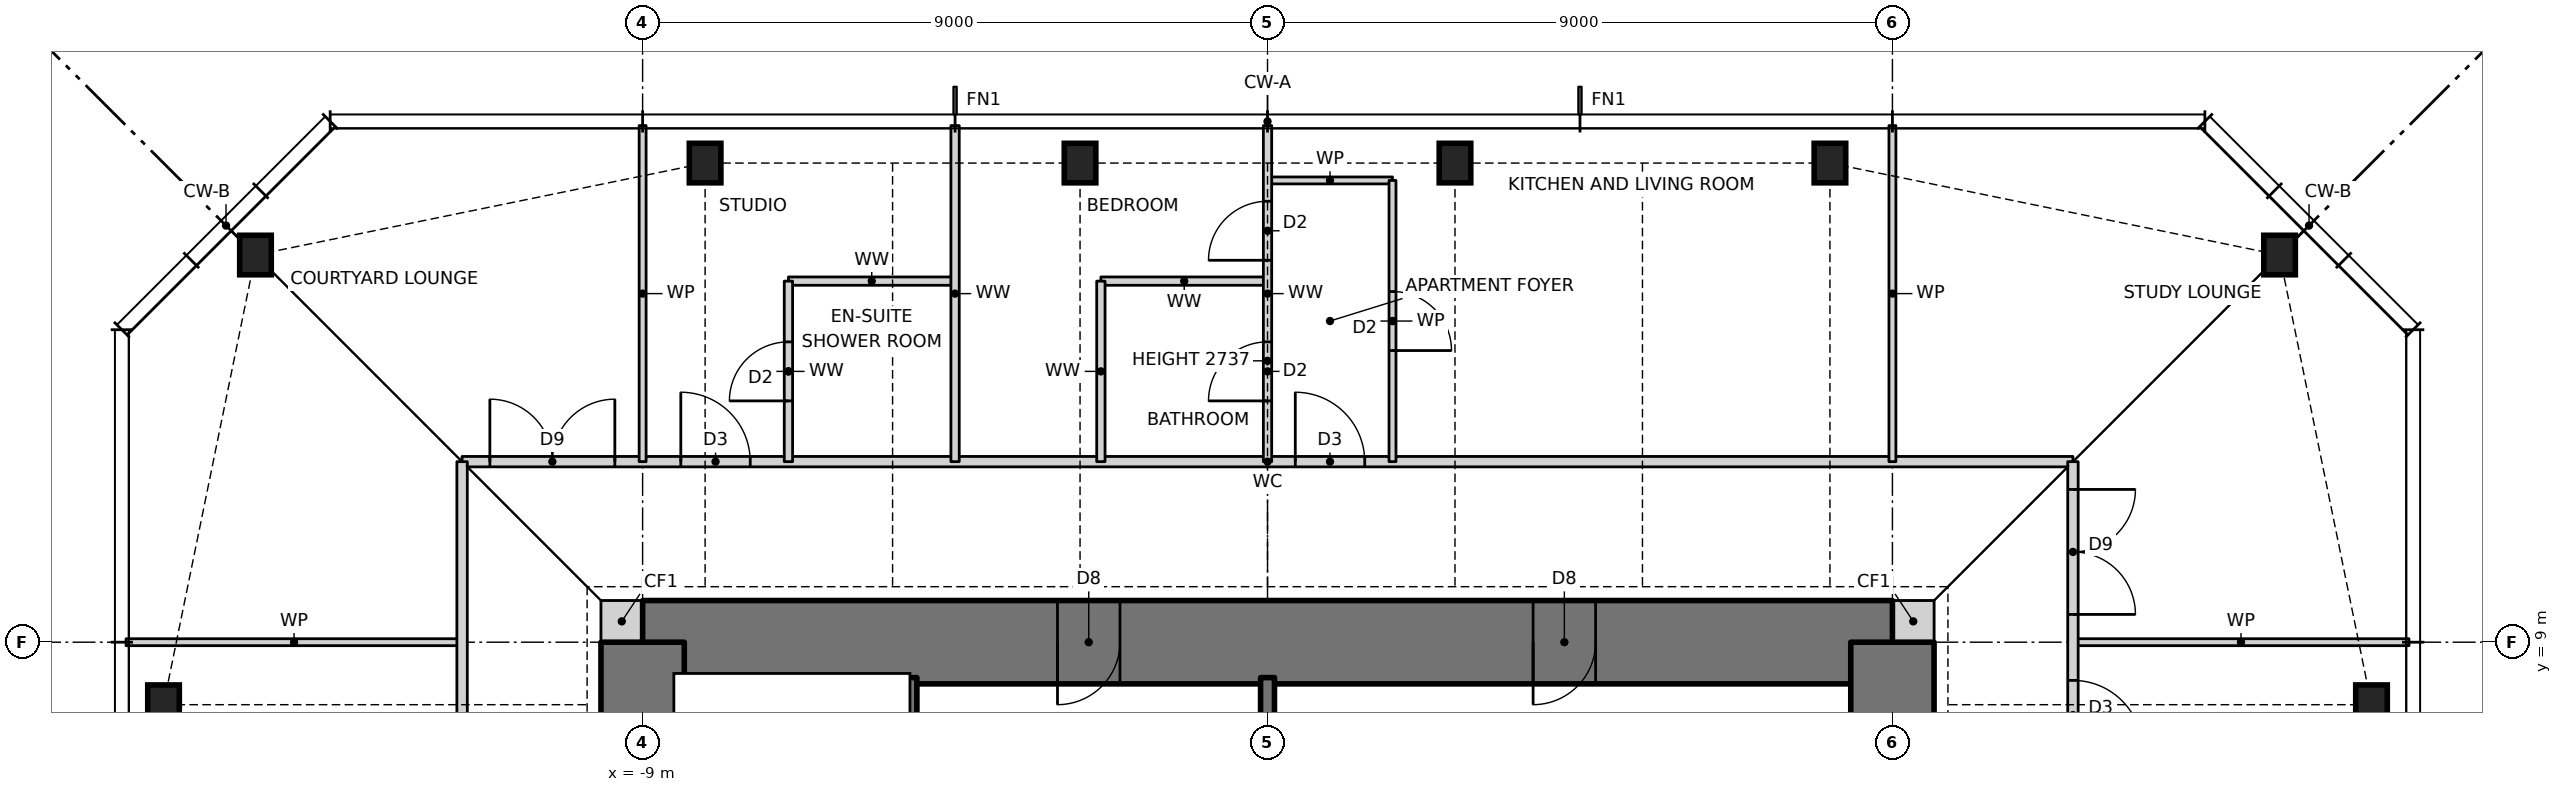
"""IFC4 building model, lengths in metres.
Left out: names, types, materials, properties, quantities, classifications, styles, units other than length and angle.
Written with IfcOpenShell. Run it as: python <this file> out.ifc"""

import sys

from ifc_helpers import new_model, si_unit, direction, frame, frame_2d, origin, origin_2d, place, context, subcontext, project, spatial, rectangle, i_section, extrude, element, fill, save


model = new_model("IFC4")
c1 = context("Model", 3, precision=1e-05, world=origin(), true_north=direction((0.0, 1.0)))
c2 = subcontext(c1, "Body", "Model", "MODEL_VIEW")
j1 = project(units=[si_unit("LENGTHUNIT", "METRE"), si_unit("PLANEANGLEUNIT", "RADIAN")], contexts=[c1])
p1 = place(None, origin())
s1 = spatial("IfcSite", under=j1, at=p1, CompositionType="ELEMENT")
p2 = place(p1, origin())
s2 = spatial("IfcBuilding", under=s1, at=p2, CompositionType="ELEMENT")
p3 = place(p2, frame((0.0, 0.0, 229.0)))
s3 = spatial("IfcBuildingStorey", under=s2, at=p3, CompositionType="ELEMENT", Elevation=229.0)
for number, where, z_axis, x_axis in (
    (1, (15.9, 8.1, 0.0), (0.0, 0.0, 1.0), (1.0, 0.0, 0.0)),
    (2, (14.576, 14.576, 0.0), (0.0, 0.0, 1.0), (1.0, 0.0, 0.0)),
    (3, (8.1, 15.9, 0.0), (0.0, 0.0, 1.0), (1.0, 0.0, 0.0)),
    (4, (2.7, 15.9, 0.0), (0.0, 0.0, 1.0), (1.0, 0.0, 0.0)),
    (5, (-2.7, 15.9, 0.0), (0.0, 0.0, 1.0), (1.0, 0.0, 0.0)),
    (6, (-8.1, 15.9, 0.0), (0.0, 0.0, 1.0), (1.0, 0.0, 0.0)),
    (7, (-14.576, 14.576, 0.0), (0.0, 0.0, 1.0), (1.0, 0.0, 0.0)),
    (8, (-15.9, 8.1, 0.0), (0.0, 0.0, 1.0), (1.0, 0.0, 0.0)),
):
    element("IfcColumn", number, at=place(p3, frame(where, z_axis=z_axis, x_axis=x_axis)), inside=s3, PredefinedType="COLUMN", context=c2, shape_type="SweptSolid", body=[
        extrude(i_section(OverallWidth=0.455, OverallDepth=0.569, WebThickness=0.078, FlangeThickness=0.125, at=origin_2d()), origin(), (0.0, 0.0, 1.0), 3.5),
    ])
for number, where, z_axis, x_axis in (
    (9, (9.0, 9.3, 0.0), (0.0, 0.0, 1.0), (1.0, 0.0, 0.0)),
    (10, (-9.6, 9.3, 0.0), (0.0, 0.0, 1.0), (1.0, 0.0, 0.0)),
):
    element("IfcWall", number, at=place(p3, frame(where, z_axis=z_axis, x_axis=x_axis)), inside=s3, PredefinedType="SOLIDWALL", context=c2, shape_type="SweptSolid", body=[
        extrude(rectangle(XDim=0.6, YDim=0.6, at=frame_2d((0.3, 0.0))), origin(), (0.0, 0.0, 1.0), 3.5),
    ])
p4 = place(p3, frame((9.0, 9.0, 0.0), z_axis=(0.0, 0.0, 1.0), x_axis=(-1.0, 0.0, 0.0)))
e11 = element("IfcWall", 11, at=p4, inside=s3, PredefinedType="SHEAR", context=c2, shape_type="SweptSolid", body=[
    extrude(rectangle(XDim=18.0, YDim=1.2, at=frame_2d((9.0, 0.0))), origin(), (0.0, 0.0, 1.0), 3.5),
])
p5 = place(p4, frame((11.125, 0.0, 0.0)))
e12 = element("IfcOpeningElement", 12, at=p5, cuts=e11, PredefinedType="OPENING", context=c2, shape_type="SweptSolid", body=[
    extrude(rectangle(XDim=0.9, YDim=2.1, at=frame_2d((0.45, 1.05))), frame((0.0, 0.61, 0.0), z_axis=(0.0, -1.0, 0.0), x_axis=(1.0, 0.0, 0.0)), (0.0, 0.0, 1.0), 1.22),
])
p6 = place(p4, frame((4.275, 0.0, 0.0)))
e13 = element("IfcOpeningElement", 13, at=p6, cuts=e11, PredefinedType="OPENING", context=c2, shape_type="SweptSolid", body=[
    extrude(rectangle(XDim=0.9, YDim=2.1, at=frame_2d((0.45, 1.05))), frame((0.0, 0.61, 0.0), z_axis=(0.0, -1.0, 0.0), x_axis=(1.0, 0.0, 0.0)), (0.0, 0.0, 1.0), 1.22),
])
p7 = place(p3, frame((9.0, -9.0, 0.0), z_axis=(0.0, 0.0, 1.0), x_axis=(0.0, 1.0, 0.0)))
e14 = element("IfcWall", 14, at=p7, inside=s3, PredefinedType="SHEAR", context=c2, shape_type="SweptSolid", body=[
    extrude(rectangle(XDim=18.0, YDim=1.2, at=frame_2d((9.0, 0.0))), origin(), (0.0, 0.0, 1.0), 3.5),
])
p8 = place(p7, frame((8.5, 0.0, 0.0)))
e15 = element("IfcOpeningElement", 15, at=p8, cuts=e14, PredefinedType="OPENING", context=c2, shape_type="SweptSolid", body=[
    extrude(rectangle(XDim=1.0, YDim=2.1, at=frame_2d((0.5, 1.05))), frame((0.0, 0.61, 0.0), z_axis=(0.0, -1.0, 0.0), x_axis=(1.0, 0.0, 0.0)), (0.0, 0.0, 1.0), 1.22),
])
p9 = place(p3, frame((-9.0, 9.0, 0.0), z_axis=(0.0, 0.0, 1.0), x_axis=(0.0, -1.0, 0.0)))
e16 = element("IfcWall", 16, at=p9, inside=s3, PredefinedType="SHEAR", context=c2, shape_type="SweptSolid", body=[
    extrude(rectangle(XDim=18.0, YDim=1.2, at=frame_2d((9.0, 0.0))), origin(), (0.0, 0.0, 1.0), 3.5),
])
p10 = place(p9, frame((8.5, 0.0, 0.0)))
e17 = element("IfcOpeningElement", 17, at=p10, cuts=e16, PredefinedType="OPENING", context=c2, shape_type="SweptSolid", body=[
    extrude(rectangle(XDim=1.0, YDim=2.1, at=frame_2d((0.5, 1.05))), frame((0.0, 0.61, 0.0), z_axis=(0.0, -1.0, 0.0), x_axis=(1.0, 0.0, 0.0)), (0.0, 0.0, 1.0), 1.22),
])
for number, where, z_axis, x_axis in (
    (18, (-16.44, 9.0, 0.0), (0.0, 0.0, 1.0), (1.0, 0.0, 0.0)),
    (19, (11.6, 9.0, 0.0), (0.0, 0.0, 1.0), (1.0, 0.0, 0.0)),
):
    element("IfcWall", number, at=place(p3, frame(where, z_axis=z_axis, x_axis=x_axis)), inside=s3, PredefinedType="PARTITIONING", context=c2, shape_type="SweptSolid", body=[
        extrude(rectangle(XDim=4.84, YDim=0.1, at=frame_2d((2.42, 0.0))), origin(), (0.0, 0.0, 1.0), 3.27),
    ])
p11 = place(p3, frame((-11.6, 11.6, 0.0), z_axis=(0.0, 0.0, 1.0), x_axis=(1.0, 0.0, 0.0)))
e20 = element("IfcWall", 20, at=p11, inside=s3, PredefinedType="PARTITIONING", context=c2, shape_type="SweptSolid", body=[
    extrude(rectangle(XDim=23.2, YDim=0.15, at=frame_2d((11.6, 0.0))), origin(), (0.0, 0.0, 1.0), 3.27),
])
p12 = place(p11, frame((12.0, 0.0, 0.0)))
e21 = element("IfcOpeningElement", 21, at=p12, cuts=e20, PredefinedType="OPENING", context=c2, shape_type="SweptSolid", body=[
    extrude(rectangle(XDim=1.0, YDim=2.1, at=frame_2d((0.5, 1.05))), frame((0.0, 0.085, 0.0), z_axis=(0.0, -1.0, 0.0), x_axis=(1.0, 0.0, 0.0)), (0.0, 0.0, 1.0), 0.17),
])
p13 = place(p11, frame((3.15, 0.0, 0.0)))
e22 = element("IfcOpeningElement", 22, at=p13, cuts=e20, PredefinedType="OPENING", context=c2, shape_type="SweptSolid", body=[
    extrude(rectangle(XDim=1.0, YDim=2.1, at=frame_2d((0.5, 1.05))), frame((0.0, 0.085, 0.0), z_axis=(0.0, -1.0, 0.0), x_axis=(1.0, 0.0, 0.0)), (0.0, 0.0, 1.0), 0.17),
])
p14 = place(p11, frame((0.4, 0.0, 0.0)))
e23 = element("IfcOpeningElement", 23, at=p14, cuts=e20, PredefinedType="OPENING", context=c2, shape_type="SweptSolid", body=[
    extrude(rectangle(XDim=1.8, YDim=2.1, at=frame_2d((0.9, 1.05))), frame((0.0, 0.085, 0.0), z_axis=(0.0, -1.0, 0.0), x_axis=(1.0, 0.0, 0.0)), (0.0, 0.0, 1.0), 0.17),
])
for number, where, z_axis, x_axis in (
    (24, (-6.9, 14.2, 0.0), (0.0, 0.0, 1.0), (1.0, 0.0, 0.0)),
    (25, (-2.4, 14.2, 0.0), (0.0, 0.0, 1.0), (1.0, 0.0, 0.0)),
):
    element("IfcWall", number, at=place(p3, frame(where, z_axis=z_axis, x_axis=x_axis)), inside=s3, PredefinedType="PARTITIONING", context=c2, shape_type="SweptSolid", body=[
        extrude(rectangle(XDim=2.4, YDim=0.12, at=frame_2d((1.2, 0.0))), origin(), (0.0, 0.0, 1.0), 3.27),
    ])
p15 = place(p3, frame((0.0, 15.65, 0.0), z_axis=(0.0, 0.0, 1.0), x_axis=(1.0, 0.0, 0.0)))
e26 = element("IfcWall", 26, at=p15, inside=s3, PredefinedType="PARTITIONING", context=c2, shape_type="SweptSolid", body=[
    extrude(rectangle(XDim=1.8, YDim=0.1, at=frame_2d((0.9, 0.0))), origin(), (0.0, 0.0, 1.0), 3.27),
])
p16 = place(p3, frame((11.6, -12.1, 0.0), z_axis=(0.0, 0.0, 1.0), x_axis=(0.0, 1.0, 0.0)))
e27 = element("IfcWall", 27, at=p16, inside=s3, PredefinedType="PARTITIONING", context=c2, shape_type="SweptSolid", body=[
    extrude(rectangle(XDim=23.7, YDim=0.15, at=frame_2d((11.85, 0.0))), origin(), (0.0, 0.0, 1.0), 3.27),
])
p17 = place(p16, frame((10.7, 0.0, 0.0)))
e28 = element("IfcOpeningElement", 28, at=p17, cuts=e27, PredefinedType="OPENING", context=c2, shape_type="SweptSolid", body=[
    extrude(rectangle(XDim=1.0, YDim=2.1, at=frame_2d((0.5, 1.05))), frame((0.0, 0.085, 0.0), z_axis=(0.0, -1.0, 0.0), x_axis=(1.0, 0.0, 0.0)), (0.0, 0.0, 1.0), 0.17),
])
p18 = place(p16, frame((19.55, 0.0, 0.0)))
e29 = element("IfcOpeningElement", 29, at=p18, cuts=e27, PredefinedType="OPENING", context=c2, shape_type="SweptSolid", body=[
    extrude(rectangle(XDim=1.0, YDim=2.1, at=frame_2d((0.5, 1.05))), frame((0.0, 0.085, 0.0), z_axis=(0.0, -1.0, 0.0), x_axis=(1.0, 0.0, 0.0)), (0.0, 0.0, 1.0), 0.17),
])
p19 = place(p16, frame((21.5, 0.0, 0.0)))
e30 = element("IfcOpeningElement", 30, at=p19, cuts=e27, PredefinedType="OPENING", context=c2, shape_type="SweptSolid", body=[
    extrude(rectangle(XDim=1.8, YDim=2.1, at=frame_2d((0.9, 1.05))), frame((0.0, 0.085, 0.0), z_axis=(0.0, -1.0, 0.0), x_axis=(1.0, 0.0, 0.0)), (0.0, 0.0, 1.0), 0.17),
])
p20 = place(p16, frame((0.65, 0.0, 0.0)))
e31 = element("IfcOpeningElement", 31, at=p20, cuts=e27, PredefinedType="OPENING", context=c2, shape_type="SweptSolid", body=[
    extrude(rectangle(XDim=1.8, YDim=2.1, at=frame_2d((0.9, 1.05))), frame((0.0, 0.085, 0.0), z_axis=(0.0, -1.0, 0.0), x_axis=(1.0, 0.0, 0.0)), (0.0, 0.0, 1.0), 0.17),
])
p21 = place(p3, frame((9.0, 11.6, 0.0), z_axis=(0.0, 0.0, 1.0), x_axis=(0.0, 1.0, 0.0)))
e32 = element("IfcWall", 32, at=p21, inside=s3, PredefinedType="PARTITIONING", context=c2, shape_type="SweptSolid", body=[
    extrude(rectangle(XDim=4.84, YDim=0.1, at=frame_2d((2.42, 0.0))), origin(), (0.0, 0.0, 1.0), 3.27),
])
p22 = place(p3, frame((1.8, 11.6, 0.0), z_axis=(0.0, 0.0, 1.0), x_axis=(0.0, 1.0, 0.0)))
e33 = element("IfcWall", 33, at=p22, inside=s3, PredefinedType="PARTITIONING", context=c2, shape_type="SweptSolid", body=[
    extrude(rectangle(XDim=4.05, YDim=0.1, at=frame_2d((2.025, 0.0))), origin(), (0.0, 0.0, 1.0), 3.27),
])
p23 = place(p22, frame((1.6, 0.0, 0.0)))
e34 = element("IfcOpeningElement", 34, at=p23, cuts=e33, PredefinedType="OPENING", context=c2, shape_type="SweptSolid", body=[
    extrude(rectangle(XDim=0.85, YDim=2.1, at=frame_2d((0.425, 1.05))), frame((0.0, 0.06, 0.0), z_axis=(0.0, -1.0, 0.0), x_axis=(1.0, 0.0, 0.0)), (0.0, 0.0, 1.0), 0.12),
])
p24 = place(p3, frame((0.0, 4.4, 0.0), z_axis=(0.0, 0.0, 1.0), x_axis=(0.0, 1.0, 0.0)))
e35 = element("IfcWall", 35, at=p24, inside=s3, PredefinedType="SOLIDWALL", context=c2, shape_type="SweptSolid", body=[
    extrude(rectangle(XDim=4.09, YDim=0.2, at=frame_2d((2.045, 0.0))), origin(), (0.0, 0.0, 1.0), 3.5),
])
p25 = place(p3, frame((0.0, 11.6, 0.0), z_axis=(0.0, 0.0, 1.0), x_axis=(0.0, 1.0, 0.0)))
e36 = element("IfcWall", 36, at=p25, inside=s3, PredefinedType="PARTITIONING", context=c2, shape_type="SweptSolid", body=[
    extrude(rectangle(XDim=4.84, YDim=0.12, at=frame_2d((2.42, 0.0))), origin(), (0.0, 0.0, 1.0), 2.737),
])
p26 = place(p25, frame((2.9, 0.0, 0.0)))
e37 = element("IfcOpeningElement", 37, at=p26, cuts=e36, PredefinedType="OPENING", context=c2, shape_type="SweptSolid", body=[
    extrude(rectangle(XDim=0.85, YDim=2.1, at=frame_2d((0.425, 1.05))), frame((0.0, 0.07, 0.0), z_axis=(0.0, -1.0, 0.0), x_axis=(1.0, 0.0, 0.0)), (0.0, 0.0, 1.0), 0.14),
])
p27 = place(p25, frame((0.875, 0.0, 0.0)))
e38 = element("IfcOpeningElement", 38, at=p27, cuts=e36, PredefinedType="OPENING", context=c2, shape_type="SweptSolid", body=[
    extrude(rectangle(XDim=0.85, YDim=2.1, at=frame_2d((0.425, 1.05))), frame((0.0, 0.07, 0.0), z_axis=(0.0, -1.0, 0.0), x_axis=(1.0, 0.0, 0.0)), (0.0, 0.0, 1.0), 0.14),
])
p28 = place(p3, frame((-2.4, 11.6, 0.0), z_axis=(0.0, 0.0, 1.0), x_axis=(0.0, 1.0, 0.0)))
e39 = element("IfcWall", 39, at=p28, inside=s3, PredefinedType="PARTITIONING", context=c2, shape_type="SweptSolid", body=[
    extrude(rectangle(XDim=2.6, YDim=0.12, at=frame_2d((1.3, 0.0))), origin(), (0.0, 0.0, 1.0), 3.27),
])
p29 = place(p3, frame((-4.5, 11.6, 0.0), z_axis=(0.0, 0.0, 1.0), x_axis=(0.0, 1.0, 0.0)))
e40 = element("IfcWall", 40, at=p29, inside=s3, PredefinedType="PARTITIONING", context=c2, shape_type="SweptSolid", body=[
    extrude(rectangle(XDim=4.84, YDim=0.12, at=frame_2d((2.42, 0.0))), origin(), (0.0, 0.0, 1.0), 3.27),
])
p30 = place(p3, frame((-5.15, 1.6, 0.0), z_axis=(0.0, 0.0, 1.0), x_axis=(0.0, 1.0, 0.0)))
e41 = element("IfcWall", 41, at=p30, inside=s3, PredefinedType="SOLIDWALL", context=c2, shape_type="SweptSolid", body=[
    extrude(rectangle(XDim=6.89, YDim=0.2, at=frame_2d((3.445, 0.0))), origin(), (0.0, 0.0, 1.0), 3.5),
])
p31 = place(p3, frame((-6.9, 11.6, 0.0), z_axis=(0.0, 0.0, 1.0), x_axis=(0.0, 1.0, 0.0)))
e42 = element("IfcWall", 42, at=p31, inside=s3, PredefinedType="PARTITIONING", context=c2, shape_type="SweptSolid", body=[
    extrude(rectangle(XDim=2.6, YDim=0.12, at=frame_2d((1.3, 0.0))), origin(), (0.0, 0.0, 1.0), 3.27),
])
p32 = place(p31, frame((0.875, 0.0, 0.0)))
e43 = element("IfcOpeningElement", 43, at=p32, cuts=e42, PredefinedType="OPENING", context=c2, shape_type="SweptSolid", body=[
    extrude(rectangle(XDim=0.85, YDim=2.1, at=frame_2d((0.425, 1.05))), frame((0.0, 0.07, 0.0), z_axis=(0.0, -1.0, 0.0), x_axis=(1.0, 0.0, 0.0)), (0.0, 0.0, 1.0), 0.14),
])
p33 = place(p3, frame((-9.0, 11.6, 0.0), z_axis=(0.0, 0.0, 1.0), x_axis=(0.0, 1.0, 0.0)))
e44 = element("IfcWall", 44, at=p33, inside=s3, PredefinedType="PARTITIONING", context=c2, shape_type="SweptSolid", body=[
    extrude(rectangle(XDim=4.84, YDim=0.1, at=frame_2d((2.42, 0.0))), origin(), (0.0, 0.0, 1.0), 3.27),
])
p34 = place(p3, frame((-11.6, -12.1, 0.0), z_axis=(0.0, 0.0, 1.0), x_axis=(0.0, 1.0, 0.0)))
e45 = element("IfcWall", 45, at=p34, inside=s3, PredefinedType="PARTITIONING", context=c2, shape_type="SweptSolid", body=[
    extrude(rectangle(XDim=23.7, YDim=0.15, at=frame_2d((11.85, 0.0))), origin(), (0.0, 0.0, 1.0), 3.27),
])
p35 = place(p34, frame((12.5, 0.0, 0.0)))
e46 = element("IfcOpeningElement", 46, at=p35, cuts=e45, PredefinedType="OPENING", context=c2, shape_type="SweptSolid", body=[
    extrude(rectangle(XDim=1.0, YDim=2.1, at=frame_2d((0.5, 1.05))), frame((0.0, 0.085, 0.0), z_axis=(0.0, -1.0, 0.0), x_axis=(1.0, 0.0, 0.0)), (0.0, 0.0, 1.0), 0.17),
])
p36 = place(p34, frame((3.65, 0.0, 0.0)))
e47 = element("IfcOpeningElement", 47, at=p36, cuts=e45, PredefinedType="OPENING", context=c2, shape_type="SweptSolid", body=[
    extrude(rectangle(XDim=1.0, YDim=2.1, at=frame_2d((0.5, 1.05))), frame((0.0, 0.085, 0.0), z_axis=(0.0, -1.0, 0.0), x_axis=(1.0, 0.0, 0.0)), (0.0, 0.0, 1.0), 0.17),
])
p37 = place(p34, frame((1.125, 0.0, 0.0)))
e48 = element("IfcOpeningElement", 48, at=p37, cuts=e45, PredefinedType="OPENING", context=c2, shape_type="SweptSolid", body=[
    extrude(rectangle(XDim=0.85, YDim=2.1, at=frame_2d((0.425, 1.05))), frame((0.0, 0.085, 0.0), z_axis=(0.0, -1.0, 0.0), x_axis=(1.0, 0.0, 0.0)), (0.0, 0.0, 1.0), 0.17),
])
p38 = place(p18, frame((1.0, 0.0, 0.0), z_axis=(0.0, 0.0, 1.0), x_axis=(-1.0, 0.0, 0.0)))
e49 = element("IfcDoor", 49, at=p38, inside=s3, OperationType="SINGLE_SWING_RIGHT", PredefinedType="DOOR", context=c2, shape_type="SweptSolid", body=[
    extrude(rectangle(XDim=1.0, YDim=2.1, at=frame_2d((0.5, 1.05))), frame((0.0, 0.025, 0.0), z_axis=(0.0, -1.0, 0.0), x_axis=(1.0, 0.0, 0.0)), (0.0, 0.0, 1.0), 0.05),
])
fill(e29, e49)
p39 = place(p12, origin())
e50 = element("IfcDoor", 50, at=p39, inside=s3, OperationType="SINGLE_SWING_LEFT", PredefinedType="DOOR", context=c2, shape_type="SweptSolid", body=[
    extrude(rectangle(XDim=1.0, YDim=2.1, at=frame_2d((0.5, 1.05))), frame((0.0, 0.025, 0.0), z_axis=(0.0, -1.0, 0.0), x_axis=(1.0, 0.0, 0.0)), (0.0, 0.0, 1.0), 0.05),
])
fill(e21, e50)
p40 = place(p23, frame((0.85, 0.0, 0.0), z_axis=(0.0, 0.0, 1.0), x_axis=(-1.0, 0.0, 0.0)))
e51 = element("IfcDoor", 51, at=p40, inside=s3, OperationType="SINGLE_SWING_RIGHT", PredefinedType="DOOR", context=c2, shape_type="SweptSolid", body=[
    extrude(rectangle(XDim=0.85, YDim=2.1, at=frame_2d((0.425, 1.05))), frame((0.0, 0.025, 0.0), z_axis=(0.0, -1.0, 0.0), x_axis=(1.0, 0.0, 0.0)), (0.0, 0.0, 1.0), 0.05),
])
fill(e34, e51)
p41 = place(p26, origin())
e52 = element("IfcDoor", 52, at=p41, inside=s3, OperationType="SINGLE_SWING_LEFT", PredefinedType="DOOR", context=c2, shape_type="SweptSolid", body=[
    extrude(rectangle(XDim=0.85, YDim=2.1, at=frame_2d((0.425, 1.05))), frame((0.0, 0.025, 0.0), z_axis=(0.0, -1.0, 0.0), x_axis=(1.0, 0.0, 0.0)), (0.0, 0.0, 1.0), 0.05),
])
fill(e37, e52)
p42 = place(p27, origin())
e53 = element("IfcDoor", 53, at=p42, inside=s3, OperationType="SINGLE_SWING_LEFT", PredefinedType="DOOR", context=c2, shape_type="SweptSolid", body=[
    extrude(rectangle(XDim=0.85, YDim=2.1, at=frame_2d((0.425, 1.05))), frame((0.0, 0.025, 0.0), z_axis=(0.0, -1.0, 0.0), x_axis=(1.0, 0.0, 0.0)), (0.0, 0.0, 1.0), 0.05),
])
fill(e38, e53)
p43 = place(p13, origin())
e54 = element("IfcDoor", 54, at=p43, inside=s3, OperationType="SINGLE_SWING_LEFT", PredefinedType="DOOR", context=c2, shape_type="SweptSolid", body=[
    extrude(rectangle(XDim=1.0, YDim=2.1, at=frame_2d((0.5, 1.05))), frame((0.0, 0.025, 0.0), z_axis=(0.0, -1.0, 0.0), x_axis=(1.0, 0.0, 0.0)), (0.0, 0.0, 1.0), 0.05),
])
fill(e22, e54)
p44 = place(p32, origin())
e55 = element("IfcDoor", 55, at=p44, inside=s3, OperationType="SINGLE_SWING_LEFT", PredefinedType="DOOR", context=c2, shape_type="SweptSolid", body=[
    extrude(rectangle(XDim=0.85, YDim=2.1, at=frame_2d((0.425, 1.05))), frame((0.0, 0.025, 0.0), z_axis=(0.0, -1.0, 0.0), x_axis=(1.0, 0.0, 0.0)), (0.0, 0.0, 1.0), 0.05),
])
fill(e43, e55)
p45 = place(p19, frame((1.8, 0.0, 0.0), z_axis=(0.0, 0.0, 1.0), x_axis=(-1.0, 0.0, 0.0)))
e56 = element("IfcDoor", 56, at=p45, inside=s3, OperationType="DOUBLE_DOOR_SINGLE_SWING", PredefinedType="DOOR", context=c2, shape_type="SweptSolid", body=[
    extrude(rectangle(XDim=1.8, YDim=2.1, at=frame_2d((0.9, 1.05))), frame((0.0, 0.025, 0.0), z_axis=(0.0, -1.0, 0.0), x_axis=(1.0, 0.0, 0.0)), (0.0, 0.0, 1.0), 0.05),
])
fill(e30, e56)
p46 = place(p14, origin())
e57 = element("IfcDoor", 57, at=p46, inside=s3, OperationType="DOUBLE_DOOR_SINGLE_SWING", PredefinedType="DOOR", context=c2, shape_type="SweptSolid", body=[
    extrude(rectangle(XDim=1.8, YDim=2.1, at=frame_2d((0.9, 1.05))), frame((0.0, 0.025, 0.0), z_axis=(0.0, -1.0, 0.0), x_axis=(1.0, 0.0, 0.0)), (0.0, 0.0, 1.0), 0.05),
])
fill(e23, e57)
p47 = place(p5, origin())
e58 = element("IfcDoor", 58, at=p47, inside=s3, OperationType="SINGLE_SWING_RIGHT", PredefinedType="DOOR", context=c2, shape_type="SweptSolid", body=[
    extrude(rectangle(XDim=0.9, YDim=2.1, at=frame_2d((0.45, 1.05))), frame((0.0, 0.025, 0.0), z_axis=(0.0, -1.0, 0.0), x_axis=(1.0, 0.0, 0.0)), (0.0, 0.0, 1.0), 0.05),
])
fill(e12, e58)
p48 = place(p6, origin())
e59 = element("IfcDoor", 59, at=p48, inside=s3, OperationType="SINGLE_SWING_RIGHT", PredefinedType="DOOR", context=c2, shape_type="SweptSolid", body=[
    extrude(rectangle(XDim=0.9, YDim=2.1, at=frame_2d((0.45, 1.05))), frame((0.0, 0.025, 0.0), z_axis=(0.0, -1.0, 0.0), x_axis=(1.0, 0.0, 0.0)), (0.0, 0.0, 1.0), 0.05),
])
fill(e13, e59)
save(model, sys.argv[1])
